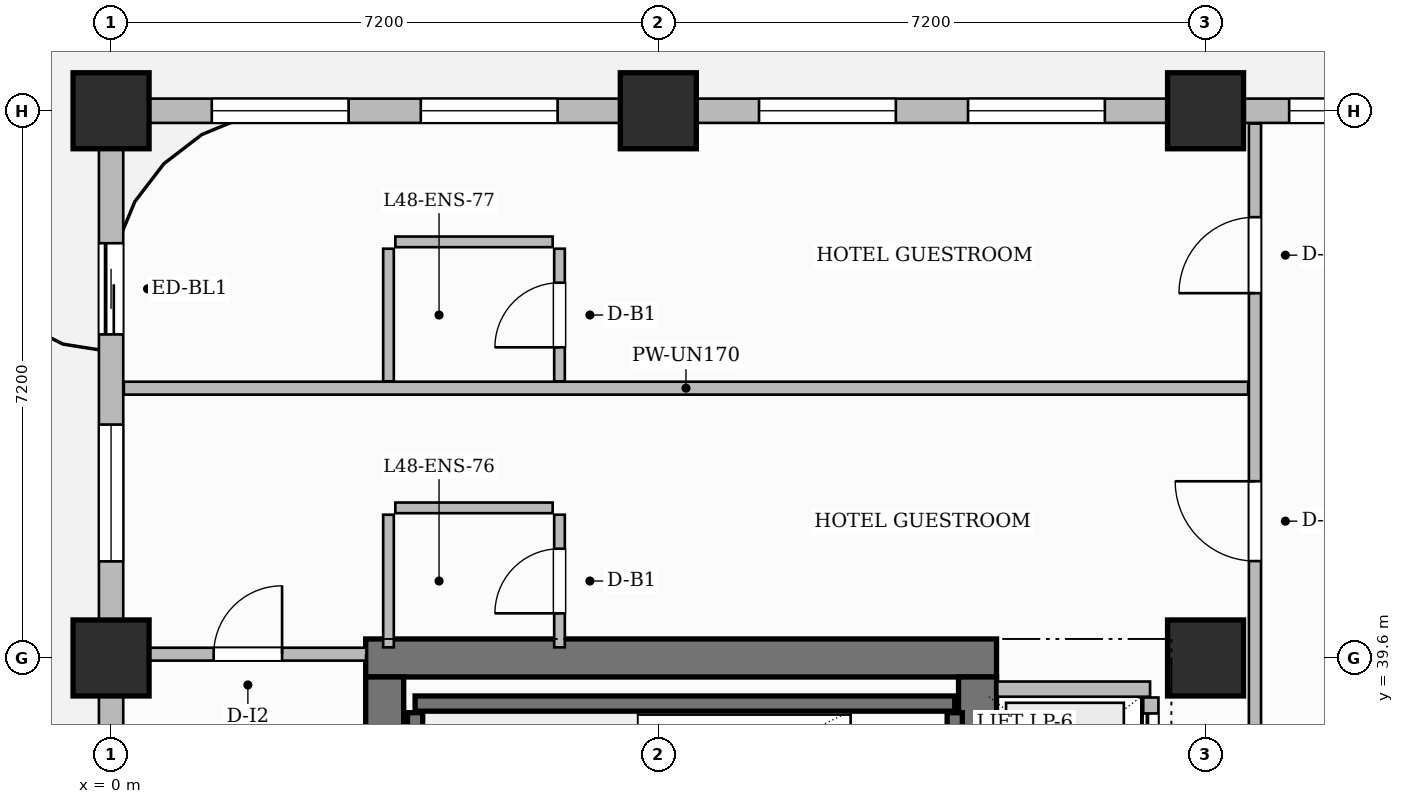
"""IFC4 building model, lengths in metres.
Left out: names, types, materials, properties, quantities, classifications, styles, units other than length and angle.
Written with IfcOpenShell. Run it as: python <this file> out.ifc"""

import sys

from ifc_helpers import new_model, si_unit, direction, frame, frame_2d, origin, origin_2d, place, context, subcontext, project, spatial, rectangle, extrude, source, transform, mapped, element, fill, save


model = new_model("IFC4")
c1 = context("Model", 3, precision=1e-05, world=origin(), true_north=direction((0.0, 1.0)))
c2 = subcontext(c1, "Body", "Model", "MODEL_VIEW")
j1 = project(units=[si_unit("LENGTHUNIT", "METRE"), si_unit("PLANEANGLEUNIT", "RADIAN")], contexts=[c1])
p1 = place(None, origin())
s1 = spatial("IfcSite", under=j1, at=p1, CompositionType="ELEMENT")
p2 = place(p1, origin())
s2 = spatial("IfcBuilding", under=s1, at=p2, CompositionType="ELEMENT")
p3 = place(p2, frame((0.0, 0.0, 192.65)))
s3 = spatial("IfcBuildingStorey", under=s2, at=p3, CompositionType="ELEMENT", Elevation=192.65)
p4 = place(p3, frame((3.35, 39.6, 0.0), z_axis=(0.0, 0.0, 1.0), x_axis=(1.0, 0.0, 0.0)))
e1 = element("IfcWall", 1, at=p4, inside=s3, PredefinedType="SHEAR", context=c2, shape_type="SweptSolid", body=[
    extrude(rectangle(XDim=8.3, YDim=0.5, at=frame_2d((4.15, 0.0))), origin(), (0.0, 0.0, 1.0), 3.85),
])
p5 = place(p3, frame((3.6, 25.45, 0.0), z_axis=(0.0, 0.0, 1.0), x_axis=(0.0, 1.0, 0.0)))
e2 = element("IfcWall", 2, at=p5, inside=s3, PredefinedType="SHEAR", context=c2, shape_type="SweptSolid", body=[
    extrude(rectangle(XDim=13.9, YDim=0.5, at=frame_2d((6.95, 0.0))), origin(), (0.0, 0.0, 1.0), 3.85),
])
p6 = place(p3, frame((11.4, 25.45, 0.0), z_axis=(0.0, 0.0, 1.0), x_axis=(0.0, 1.0, 0.0)))
e3 = element("IfcWall", 3, at=p6, inside=s3, PredefinedType="SHEAR", context=c2, shape_type="SweptSolid", body=[
    extrude(rectangle(XDim=13.9, YDim=0.5, at=frame_2d((6.95, 0.0))), origin(), (0.0, 0.0, 1.0), 3.85),
])
p7 = place(p6, frame((6.52, 0.0, 0.0)))
e4 = element("IfcOpeningElement", 4, at=p7, cuts=e3, PredefinedType="OPENING", context=c2, shape_type="SweptSolid", body=[
    extrude(rectangle(XDim=1.5, YDim=2.2, at=frame_2d((0.75, 1.1))), frame((0.0, 0.26, 0.0), z_axis=(0.0, -1.0, 0.0), x_axis=(1.0, 0.0, 0.0)), (0.0, 0.0, 1.0), 0.52),
])
m1 = source(origin(), c2, "Body", "SweptSolid", [
    extrude(rectangle(XDim=1.0, YDim=1.0, at=origin_2d()), origin(), (0.0, 0.0, 1.0), 3.85),
])
for number, where, z_axis, x_axis in (
    (5, (0.0, 39.6, 0.0), (0.0, 0.0, 1.0), (1.0, 0.0, 0.0)),
    (6, (0.0, 46.8, 0.0), (0.0, 0.0, 1.0), (1.0, 0.0, 0.0)),
    (7, (7.2, 46.8, 0.0), (0.0, 0.0, 1.0), (1.0, 0.0, 0.0)),
    (8, (14.4, 39.6, 0.0), (0.0, 0.0, 1.0), (1.0, 0.0, 0.0)),
    (9, (14.4, 46.8, 0.0), (0.0, 0.0, 1.0), (1.0, 0.0, 0.0)),
):
    element("IfcColumn", number, at=place(p3, frame(where, z_axis=z_axis, x_axis=x_axis)), inside=s3, PredefinedType="COLUMN", context=c2, shape_type="MappedRepresentation", body=[
        mapped(m1, transform((0.0, 0.0, 0.0), scale=1.0)),
    ])
p8 = place(p3, frame((4.0, 39.0, 0.0), z_axis=(0.0, 0.0, 1.0), x_axis=(1.0, 0.0, 0.0)))
e10 = element("IfcWall", 10, at=p8, inside=s3, PredefinedType="SHEAR", context=c2, shape_type="SweptSolid", body=[
    extrude(rectangle(XDim=7.1, YDim=0.2, at=frame_2d((3.55, 0.0))), origin(), (0.0, 0.0, 1.0), 3.85),
])
for number, where, z_axis, x_axis in (
    (11, (4.0, 36.18, 0.0), (0.0, 0.0, 1.0), (0.0, 1.0, 0.0)),
    (12, (11.1, 36.18, 0.0), (0.0, 0.0, 1.0), (0.0, 1.0, 0.0)),
):
    element("IfcWall", number, at=place(p3, frame(where, z_axis=z_axis, x_axis=x_axis)), inside=s3, PredefinedType="SHEAR", context=c2, shape_type="SweptSolid", body=[
        extrude(rectangle(XDim=2.7, YDim=0.2, at=frame_2d((1.35, 0.0))), origin(), (0.0, 0.0, 1.0), 3.85),
    ])
p9 = place(p3, frame((11.66, 39.19, 0.0), z_axis=(0.0, 0.0, 1.0), x_axis=(1.0, 0.0, 0.0)))
e13 = element("IfcWall", 13, at=p9, inside=s3, PredefinedType="PARTITIONING", context=c2, shape_type="SweptSolid", body=[
    extrude(rectangle(XDim=2.01, YDim=0.2, at=frame_2d((1.005, 0.0))), origin(), (0.0, 0.0, 1.0), 3.55),
])
p10 = place(p3, frame((13.68, 34.36, 0.0), z_axis=(0.0, 0.0, 1.0), x_axis=(0.0, 1.0, 0.0)))
e14 = element("IfcWall", 14, at=p10, inside=s3, PredefinedType="PARTITIONING", context=c2, shape_type="SweptSolid", body=[
    extrude(rectangle(XDim=4.72, YDim=0.2, at=frame_2d((2.36, 0.0))), origin(), (0.0, 0.0, 1.0), 3.55),
])
p11 = place(p10, frame((0.21, 0.0, 0.0)))
e15 = element("IfcOpeningElement", 15, at=p11, cuts=e14, PredefinedType="OPENING", context=c2, shape_type="SweptSolid", body=[
    extrude(rectangle(XDim=1.1, YDim=2.2, at=frame_2d((0.55, 1.1))), frame((0.0, 0.11, 0.0), z_axis=(0.0, -1.0, 0.0), x_axis=(1.0, 0.0, 0.0)), (0.0, 0.0, 1.0), 0.22),
])
p12 = place(p10, frame((1.81, 0.0, 0.0)))
e16 = element("IfcOpeningElement", 16, at=p12, cuts=e14, PredefinedType="OPENING", context=c2, shape_type="SweptSolid", body=[
    extrude(rectangle(XDim=1.1, YDim=2.2, at=frame_2d((0.55, 1.1))), frame((0.0, 0.11, 0.0), z_axis=(0.0, -1.0, 0.0), x_axis=(1.0, 0.0, 0.0)), (0.0, 0.0, 1.0), 0.22),
])
p13 = place(p10, frame((3.41, 0.0, 0.0)))
e17 = element("IfcOpeningElement", 17, at=p13, cuts=e14, PredefinedType="OPENING", context=c2, shape_type="SweptSolid", body=[
    extrude(rectangle(XDim=1.1, YDim=2.2, at=frame_2d((0.55, 1.1))), frame((0.0, 0.11, 0.0), z_axis=(0.0, -1.0, 0.0), x_axis=(1.0, 0.0, 0.0)), (0.0, 0.0, 1.0), 0.22),
])
p14 = place(p3, frame((0.24, 39.65, 0.0), z_axis=(0.0, 0.0, 1.0), x_axis=(1.0, 0.0, 0.0)))
e18 = element("IfcWall", 18, at=p14, inside=s3, PredefinedType="PARTITIONING", context=c2, shape_type="SweptSolid", body=[
    extrude(rectangle(XDim=3.12, YDim=0.17, at=frame_2d((1.56, 0.0))), origin(), (0.0, 0.0, 1.0), 3.55),
])
p15 = place(p14, frame((1.11, 0.0, 0.0)))
e19 = element("IfcOpeningElement", 19, at=p15, cuts=e18, PredefinedType="OPENING", context=c2, shape_type="SweptSolid", body=[
    extrude(rectangle(XDim=0.9, YDim=2.15, at=frame_2d((0.45, 1.075))), frame((0.0, 0.095, 0.0), z_axis=(0.0, -1.0, 0.0), x_axis=(1.0, 0.0, 0.0)), (0.0, 0.0, 1.0), 0.19),
])
p16 = place(p3, frame((15.05, 34.34, 0.0), z_axis=(0.0, 0.0, 1.0), x_axis=(0.0, 1.0, 0.0)))
e20 = element("IfcWall", 20, at=p16, inside=s3, PredefinedType="PARTITIONING", context=c2, shape_type="SweptSolid", body=[
    extrude(rectangle(XDim=12.292, YDim=0.16, at=frame_2d((6.146, 0.0))), origin(), (0.0, 0.0, 1.0), 3.55),
])
p17 = place(p16, frame((6.535, 0.0, 0.0)))
e21 = element("IfcOpeningElement", 21, at=p17, cuts=e20, PredefinedType="OPENING", context=c2, shape_type="SweptSolid", body=[
    extrude(rectangle(XDim=1.05, YDim=2.25, at=frame_2d((0.525, 1.125))), frame((0.0, 0.09, 0.0), z_axis=(0.0, -1.0, 0.0), x_axis=(1.0, 0.0, 0.0)), (0.0, 0.0, 1.0), 0.18),
])
p18 = place(p16, frame((10.06, 0.0, 0.0)))
e22 = element("IfcOpeningElement", 22, at=p18, cuts=e20, PredefinedType="OPENING", context=c2, shape_type="SweptSolid", body=[
    extrude(rectangle(XDim=1.0, YDim=2.2, at=frame_2d((0.5, 1.1))), frame((0.0, 0.09, 0.0), z_axis=(0.0, -1.0, 0.0), x_axis=(1.0, 0.0, 0.0)), (0.0, 0.0, 1.0), 0.18),
])
p19 = place(p3, frame((0.168, 43.15, 0.0), z_axis=(0.0, 0.0, 1.0), x_axis=(1.0, 0.0, 0.0)))
e23 = element("IfcWall", 23, at=p19, inside=s3, PredefinedType="PARTITIONING", context=c2, shape_type="SweptSolid", body=[
    extrude(rectangle(XDim=14.792, YDim=0.17, at=frame_2d((7.396, 0.0))), origin(), (0.0, 0.0, 1.0), 3.55),
])
p20 = place(p3, frame((3.65, 39.74, 0.0), z_axis=(0.0, 0.0, 1.0), x_axis=(0.0, 1.0, 0.0)))
e24 = element("IfcWall", 24, at=p20, inside=s3, PredefinedType="PARTITIONING", context=c2, shape_type="SweptSolid", body=[
    extrude(rectangle(XDim=1.745, YDim=0.14, at=frame_2d((0.873, 0.0))), origin(), (0.0, 0.0, 1.0), 3.55),
])
p21 = place(p3, frame((3.74, 41.575, 0.0), z_axis=(0.0, 0.0, 1.0), x_axis=(1.0, 0.0, 0.0)))
e25 = element("IfcWall", 25, at=p21, inside=s3, PredefinedType="PARTITIONING", context=c2, shape_type="SweptSolid", body=[
    extrude(rectangle(XDim=2.07, YDim=0.14, at=frame_2d((1.035, 0.0))), origin(), (0.0, 0.0, 1.0), 3.55),
])
p22 = place(p3, frame((5.9, 39.74, 0.0), z_axis=(0.0, 0.0, 1.0), x_axis=(0.0, 1.0, 0.0)))
e26 = element("IfcWall", 26, at=p22, inside=s3, PredefinedType="PARTITIONING", context=c2, shape_type="SweptSolid", body=[
    extrude(rectangle(XDim=1.745, YDim=0.14, at=frame_2d((0.873, 0.0))), origin(), (0.0, 0.0, 1.0), 3.55),
])
p23 = place(p22, frame((0.448, 0.0, 0.0)))
e27 = element("IfcOpeningElement", 27, at=p23, cuts=e26, PredefinedType="OPENING", context=c2, shape_type="SweptSolid", body=[
    extrude(rectangle(XDim=0.85, YDim=2.1, at=frame_2d((0.425, 1.05))), frame((0.0, 0.08, 0.0), z_axis=(0.0, -1.0, 0.0), x_axis=(1.0, 0.0, 0.0)), (0.0, 0.0, 1.0), 0.16),
])
p24 = place(p3, frame((3.65, 43.24, 0.0), z_axis=(0.0, 0.0, 1.0), x_axis=(0.0, 1.0, 0.0)))
e28 = element("IfcWall", 28, at=p24, inside=s3, PredefinedType="PARTITIONING", context=c2, shape_type="SweptSolid", body=[
    extrude(rectangle(XDim=1.745, YDim=0.14, at=frame_2d((0.873, 0.0))), origin(), (0.0, 0.0, 1.0), 3.55),
])
p25 = place(p3, frame((3.74, 45.075, 0.0), z_axis=(0.0, 0.0, 1.0), x_axis=(1.0, 0.0, 0.0)))
e29 = element("IfcWall", 29, at=p25, inside=s3, PredefinedType="PARTITIONING", context=c2, shape_type="SweptSolid", body=[
    extrude(rectangle(XDim=2.07, YDim=0.14, at=frame_2d((1.035, 0.0))), origin(), (0.0, 0.0, 1.0), 3.55),
])
p26 = place(p3, frame((5.9, 43.24, 0.0), z_axis=(0.0, 0.0, 1.0), x_axis=(0.0, 1.0, 0.0)))
e30 = element("IfcWall", 30, at=p26, inside=s3, PredefinedType="PARTITIONING", context=c2, shape_type="SweptSolid", body=[
    extrude(rectangle(XDim=1.745, YDim=0.14, at=frame_2d((0.873, 0.0))), origin(), (0.0, 0.0, 1.0), 3.55),
])
p27 = place(p26, frame((0.448, 0.0, 0.0)))
e31 = element("IfcOpeningElement", 31, at=p27, cuts=e30, PredefinedType="OPENING", context=c2, shape_type="SweptSolid", body=[
    extrude(rectangle(XDim=0.85, YDim=2.1, at=frame_2d((0.425, 1.05))), frame((0.0, 0.08, 0.0), z_axis=(0.0, -1.0, 0.0), x_axis=(1.0, 0.0, 0.0)), (0.0, 0.0, 1.0), 0.16),
])
p28 = place(p3, frame((0.0, 25.25, 0.0), z_axis=(0.0, 0.0, 1.0), x_axis=(0.0, 1.0, 0.0)))
e32 = element("IfcWall", 32, at=p28, inside=s3, PredefinedType="SOLIDWALL", context=c2, shape_type="SweptSolid", body=[
    extrude(rectangle(XDim=21.5, YDim=0.32, at=frame_2d((10.75, 0.0))), origin(), (0.0, 0.0, 1.0), 3.035),
])
p29 = place(p28, frame((18.607, 0.0, 0.0)))
e33 = element("IfcOpeningElement", 33, at=p29, cuts=e32, PredefinedType="OPENING", context=c2, shape_type="SweptSolid", body=[
    extrude(rectangle(XDim=1.2, YDim=2.2, at=frame_2d((0.6, 1.1))), frame((0.0, 0.17, 0.0), z_axis=(0.0, -1.0, 0.0), x_axis=(1.0, 0.0, 0.0)), (0.0, 0.0, 1.0), 0.34),
])
p30 = place(p28, frame((0.8, 0.0, 0.0)))
e34 = element("IfcOpeningElement", 34, at=p30, cuts=e32, PredefinedType="OPENING", context=c2, shape_type="SweptSolid", body=[
    extrude(rectangle(XDim=1.2, YDim=2.2, at=frame_2d((0.6, 1.1))), frame((0.0, 0.17, 0.0), z_axis=(0.0, -1.0, 0.0), x_axis=(1.0, 0.0, 0.0)), (0.0, 0.0, 1.0), 0.34),
])
p31 = place(p28, frame((3.425, 0.0, 0.8)))
e35 = element("IfcOpeningElement", 35, at=p31, cuts=e32, PredefinedType="OPENING", context=c2, shape_type="SweptSolid", body=[
    extrude(rectangle(XDim=1.8, YDim=1.85, at=frame_2d((0.9, 0.925))), frame((0.0, 0.17, 0.0), z_axis=(0.0, -1.0, 0.0), x_axis=(1.0, 0.0, 0.0)), (0.0, 0.0, 1.0), 0.34),
])
p32 = place(p28, frame((8.475, 0.0, 0.8)))
e36 = element("IfcOpeningElement", 36, at=p32, cuts=e32, PredefinedType="OPENING", context=c2, shape_type="SweptSolid", body=[
    extrude(rectangle(XDim=1.8, YDim=1.85, at=frame_2d((0.9, 0.925))), frame((0.0, 0.17, 0.0), z_axis=(0.0, -1.0, 0.0), x_axis=(1.0, 0.0, 0.0)), (0.0, 0.0, 1.0), 0.34),
])
p33 = place(p28, frame((11.225, 0.0, 0.8)))
e37 = element("IfcOpeningElement", 37, at=p33, cuts=e32, PredefinedType="OPENING", context=c2, shape_type="SweptSolid", body=[
    extrude(rectangle(XDim=1.8, YDim=1.85, at=frame_2d((0.9, 0.925))), frame((0.0, 0.17, 0.0), z_axis=(0.0, -1.0, 0.0), x_axis=(1.0, 0.0, 0.0)), (0.0, 0.0, 1.0), 0.34),
])
p34 = place(p28, frame((15.621, 0.0, 0.8)))
e38 = element("IfcOpeningElement", 38, at=p34, cuts=e32, PredefinedType="OPENING", context=c2, shape_type="SweptSolid", body=[
    extrude(rectangle(XDim=1.8, YDim=1.85, at=frame_2d((0.9, 0.925))), frame((0.0, 0.17, 0.0), z_axis=(0.0, -1.0, 0.0), x_axis=(1.0, 0.0, 0.0)), (0.0, 0.0, 1.0), 0.34),
])
p35 = place(p3, frame((0.0, 46.8, 0.0), z_axis=(0.0, 0.0, 1.0), x_axis=(1.0, 0.0, 0.0)))
e39 = element("IfcWall", 39, at=p35, inside=s3, PredefinedType="SOLIDWALL", context=c2, shape_type="SweptSolid", body=[
    extrude(rectangle(XDim=18.0, YDim=0.32, at=frame_2d((9.0, 0.0))), origin(), (0.0, 0.0, 1.0), 3.035),
])
p36 = place(p35, frame((1.325, 0.0, 0.8)))
e40 = element("IfcOpeningElement", 40, at=p36, cuts=e39, PredefinedType="OPENING", context=c2, shape_type="SweptSolid", body=[
    extrude(rectangle(XDim=1.8, YDim=1.85, at=frame_2d((0.9, 0.925))), frame((0.0, 0.17, 0.0), z_axis=(0.0, -1.0, 0.0), x_axis=(1.0, 0.0, 0.0)), (0.0, 0.0, 1.0), 0.34),
])
p37 = place(p35, frame((4.075, 0.0, 0.8)))
e41 = element("IfcOpeningElement", 41, at=p37, cuts=e39, PredefinedType="OPENING", context=c2, shape_type="SweptSolid", body=[
    extrude(rectangle(XDim=1.8, YDim=1.85, at=frame_2d((0.9, 0.925))), frame((0.0, 0.17, 0.0), z_axis=(0.0, -1.0, 0.0), x_axis=(1.0, 0.0, 0.0)), (0.0, 0.0, 1.0), 0.34),
])
p38 = place(p35, frame((8.525, 0.0, 0.8)))
e42 = element("IfcOpeningElement", 42, at=p38, cuts=e39, PredefinedType="OPENING", context=c2, shape_type="SweptSolid", body=[
    extrude(rectangle(XDim=1.8, YDim=1.85, at=frame_2d((0.9, 0.925))), frame((0.0, 0.17, 0.0), z_axis=(0.0, -1.0, 0.0), x_axis=(1.0, 0.0, 0.0)), (0.0, 0.0, 1.0), 0.34),
])
p39 = place(p35, frame((11.275, 0.0, 0.8)))
e43 = element("IfcOpeningElement", 43, at=p39, cuts=e39, PredefinedType="OPENING", context=c2, shape_type="SweptSolid", body=[
    extrude(rectangle(XDim=1.8, YDim=1.85, at=frame_2d((0.9, 0.925))), frame((0.0, 0.17, 0.0), z_axis=(0.0, -1.0, 0.0), x_axis=(1.0, 0.0, 0.0)), (0.0, 0.0, 1.0), 0.34),
])
p40 = place(p35, frame((15.5, 0.0, 0.8)))
e44 = element("IfcOpeningElement", 44, at=p40, cuts=e39, PredefinedType="OPENING", context=c2, shape_type="SweptSolid", body=[
    extrude(rectangle(XDim=1.4, YDim=1.85, at=frame_2d((0.7, 0.925))), frame((0.0, 0.17, 0.0), z_axis=(0.0, -1.0, 0.0), x_axis=(1.0, 0.0, 0.0)), (0.0, 0.0, 1.0), 0.34),
])
m2 = source(origin(), c2, "Body", "SweptSolid", [
    extrude(rectangle(XDim=0.9, YDim=2.15, at=frame_2d((0.45, 1.075))), frame((0.0, 0.025, 0.0), z_axis=(0.0, -1.0, 0.0), x_axis=(1.0, 0.0, 0.0)), (0.0, 0.0, 1.0), 0.05),
])
p41 = place(p15, origin())
e45 = element("IfcDoor", 45, at=p41, inside=s3, OperationType="SINGLE_SWING_RIGHT", PredefinedType="DOOR", context=c2, shape_type="MappedRepresentation", body=[
    mapped(m2, transform((0.0, 0.0, 0.0), scale=1.0)),
])
fill(e19, e45)
m3 = source(origin(), c2, "Body", "SweptSolid", [
    extrude(rectangle(XDim=0.85, YDim=2.1, at=frame_2d((0.425, 1.05))), frame((0.0, 0.025, 0.0), z_axis=(0.0, -1.0, 0.0), x_axis=(1.0, 0.0, 0.0)), (0.0, 0.0, 1.0), 0.05),
])
p42 = place(p23, origin())
e46 = element("IfcDoor", 46, at=p42, inside=s3, OperationType="SINGLE_SWING_LEFT", PredefinedType="DOOR", context=c2, shape_type="MappedRepresentation", body=[
    mapped(m3, transform((0.0, 0.0, 0.0), scale=1.0)),
])
fill(e27, e46)
m4 = source(origin(), c2, "Body", "SweptSolid", [
    extrude(rectangle(XDim=1.05, YDim=2.25, at=frame_2d((0.525, 1.125))), frame((0.0, 0.025, 0.0), z_axis=(0.0, -1.0, 0.0), x_axis=(1.0, 0.0, 0.0)), (0.0, 0.0, 1.0), 0.05),
])
p43 = place(p17, origin())
e47 = element("IfcDoor", 47, at=p43, inside=s3, OperationType="SINGLE_SWING_RIGHT", PredefinedType="DOOR", context=c2, shape_type="MappedRepresentation", body=[
    mapped(m4, transform((0.0, 0.0, 0.0), scale=1.0)),
])
fill(e21, e47)
p44 = place(p27, origin())
e48 = element("IfcDoor", 48, at=p44, inside=s3, OperationType="SINGLE_SWING_LEFT", PredefinedType="DOOR", context=c2, shape_type="MappedRepresentation", body=[
    mapped(m3, transform((0.0, 0.0, 0.0), scale=1.0)),
])
fill(e31, e48)
m5 = source(origin(), c2, "Body", "SweptSolid", [
    extrude(rectangle(XDim=1.0, YDim=2.2, at=frame_2d((0.5, 1.1))), frame((0.0, 0.025, 0.0), z_axis=(0.0, -1.0, 0.0), x_axis=(1.0, 0.0, 0.0)), (0.0, 0.0, 1.0), 0.05),
])
p45 = place(p18, origin())
e49 = element("IfcDoor", 49, at=p45, inside=s3, OperationType="SINGLE_SWING_LEFT", PredefinedType="DOOR", context=c2, shape_type="MappedRepresentation", body=[
    mapped(m5, transform((0.0, 0.0, 0.0), scale=1.0)),
])
fill(e22, e49)
m6 = source(origin(), c2, "Body", "SweptSolid", [
    extrude(rectangle(XDim=1.1, YDim=2.2, at=frame_2d((0.55, 1.1))), frame((0.0, 0.025, 0.0), z_axis=(0.0, -1.0, 0.0), x_axis=(1.0, 0.0, 0.0)), (0.0, 0.0, 1.0), 0.05),
])
p46 = place(p13, origin())
e50 = element("IfcDoor", 50, at=p46, inside=s3, OperationType="SLIDING_TO_LEFT", PredefinedType="DOOR", context=c2, shape_type="MappedRepresentation", body=[
    mapped(m6, transform((0.0, 0.0, 0.0), scale=1.0)),
])
fill(e17, e50)
m7 = source(origin(), c2, "Body", "SweptSolid", [
    extrude(rectangle(XDim=1.2, YDim=2.2, at=frame_2d((0.6, 1.1))), frame((0.0, 0.025, 0.0), z_axis=(0.0, -1.0, 0.0), x_axis=(1.0, 0.0, 0.0)), (0.0, 0.0, 1.0), 0.05),
])
p47 = place(p29, origin())
e51 = element("IfcDoor", 51, at=p47, inside=s3, OperationType="SLIDING_TO_LEFT", PredefinedType="DOOR", context=c2, shape_type="MappedRepresentation", body=[
    mapped(m7, transform((0.0, 0.0, 0.0), scale=1.0)),
])
fill(e33, e51)
m8 = source(origin(), c2, "Body", "SweptSolid", [
    extrude(rectangle(XDim=1.8, YDim=1.85, at=frame_2d((0.9, 0.925))), frame((0.0, 0.03, 0.0), z_axis=(0.0, -1.0, 0.0), x_axis=(1.0, 0.0, 0.0)), (0.0, 0.0, 1.0), 0.06),
])
p48 = place(p34, origin())
e52 = element("IfcWindow", 52, at=p48, inside=s3, PartitioningType="DOUBLE_PANEL_VERTICAL", PredefinedType="WINDOW", context=c2, shape_type="MappedRepresentation", body=[
    mapped(m8, transform((0.0, 0.0, 0.0), scale=1.0)),
])
fill(e38, e52)
p49 = place(p36, origin())
e53 = element("IfcWindow", 53, at=p49, inside=s3, PartitioningType="DOUBLE_PANEL_VERTICAL", PredefinedType="WINDOW", context=c2, shape_type="MappedRepresentation", body=[
    mapped(m8, transform((0.0, 0.0, 0.0), scale=1.0)),
])
fill(e40, e53)
p50 = place(p37, origin())
e54 = element("IfcWindow", 54, at=p50, inside=s3, PartitioningType="DOUBLE_PANEL_VERTICAL", PredefinedType="WINDOW", context=c2, shape_type="MappedRepresentation", body=[
    mapped(m8, transform((0.0, 0.0, 0.0), scale=1.0)),
])
fill(e41, e54)
p51 = place(p38, origin())
e55 = element("IfcWindow", 55, at=p51, inside=s3, PartitioningType="DOUBLE_PANEL_VERTICAL", PredefinedType="WINDOW", context=c2, shape_type="MappedRepresentation", body=[
    mapped(m8, transform((0.0, 0.0, 0.0), scale=1.0)),
])
fill(e42, e55)
p52 = place(p39, origin())
e56 = element("IfcWindow", 56, at=p52, inside=s3, PartitioningType="DOUBLE_PANEL_VERTICAL", PredefinedType="WINDOW", context=c2, shape_type="MappedRepresentation", body=[
    mapped(m8, transform((0.0, 0.0, 0.0), scale=1.0)),
])
fill(e43, e56)
m9 = source(origin(), c2, "Body", "SweptSolid", [
    extrude(rectangle(XDim=1.4, YDim=1.85, at=frame_2d((0.7, 0.925))), frame((0.0, 0.03, 0.0), z_axis=(0.0, -1.0, 0.0), x_axis=(1.0, 0.0, 0.0)), (0.0, 0.0, 1.0), 0.06),
])
p53 = place(p40, origin())
e57 = element("IfcWindow", 57, at=p53, inside=s3, PartitioningType="SINGLE_PANEL", PredefinedType="WINDOW", context=c2, shape_type="MappedRepresentation", body=[
    mapped(m9, transform((0.0, 0.0, 0.0), scale=1.0)),
])
fill(e44, e57)
save(model, sys.argv[1])
